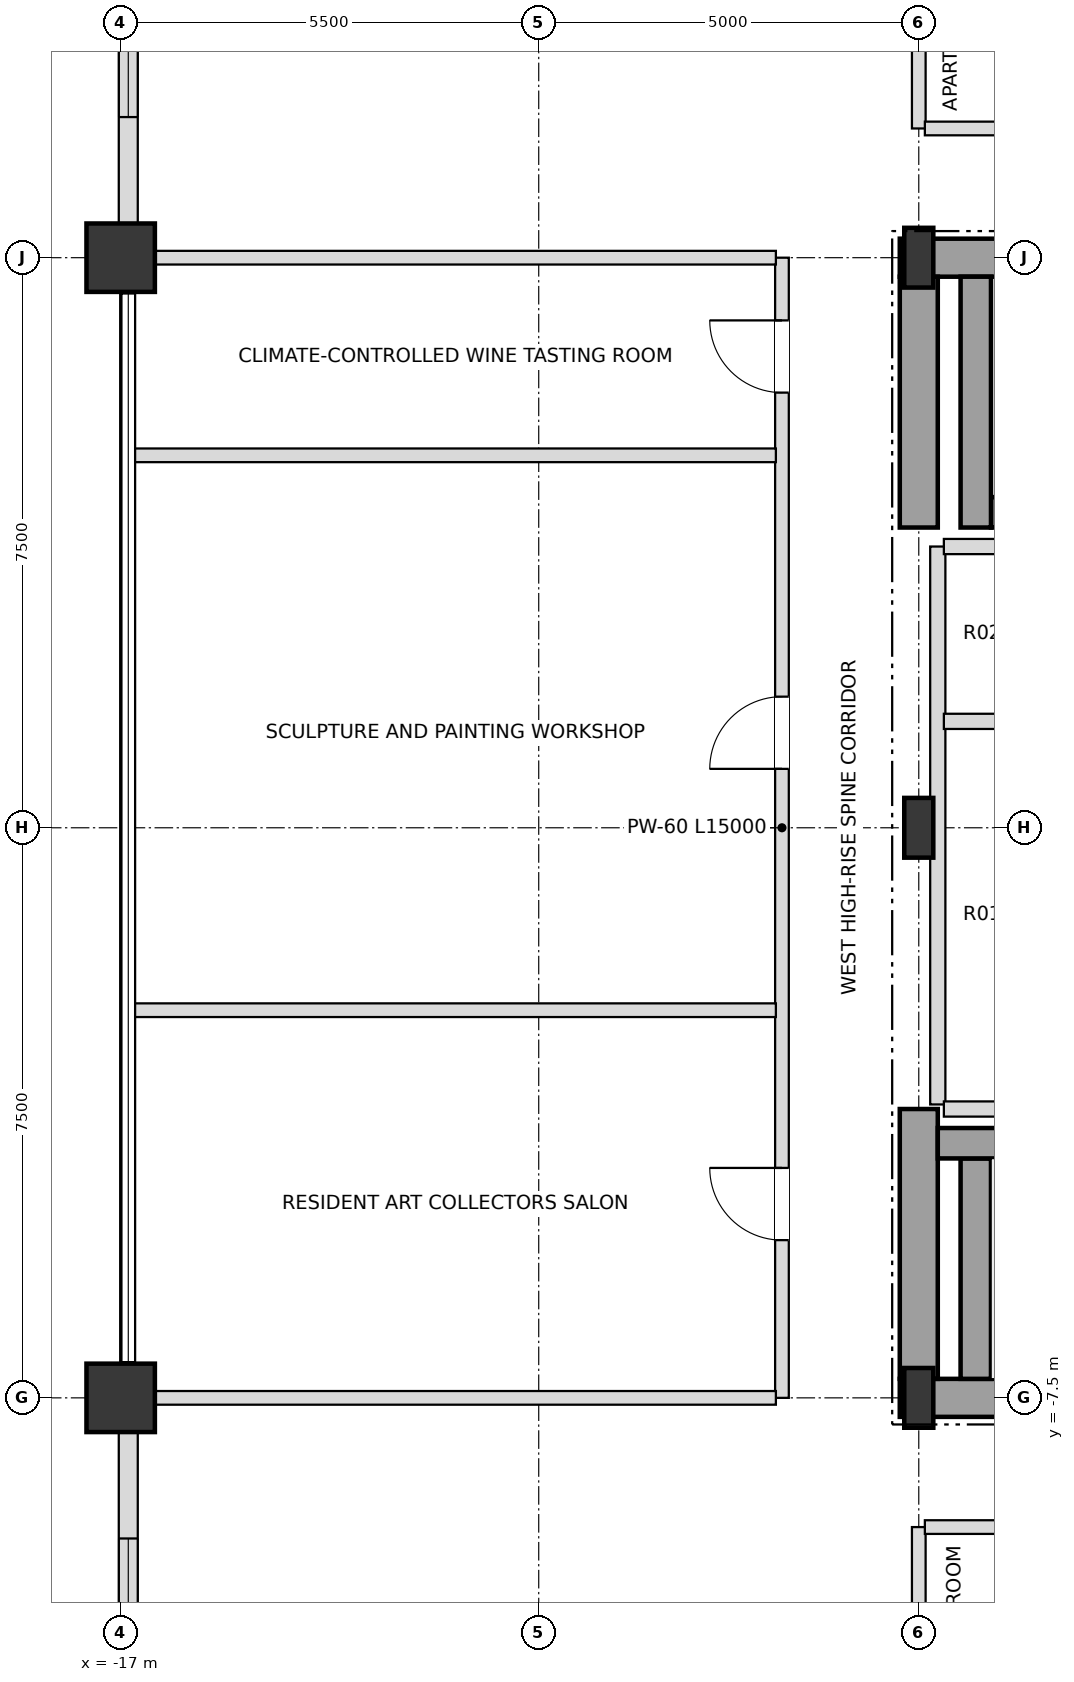
"""IFC4 building model, lengths in metres.
Left out: names, types, materials, properties, quantities, classifications, styles, units other than length and angle.
Written with IfcOpenShell. Run it as: python <this file> out.ifc"""

import sys

from ifc_helpers import new_model, si_unit, direction, frame, frame_2d, origin, origin_2d, place, context, subcontext, project, spatial, rectangle, i_section, extrude, element, fill, save


model = new_model("IFC4")
c1 = context("Model", 3, precision=1e-05, world=origin(), true_north=direction((0.0, 1.0)))
c2 = subcontext(c1, "Body", "Model", "MODEL_VIEW")
j1 = project(units=[si_unit("LENGTHUNIT", "METRE"), si_unit("PLANEANGLEUNIT", "RADIAN")], contexts=[c1])
p1 = place(None, origin())
s1 = spatial("IfcSite", under=j1, at=p1, CompositionType="ELEMENT")
p2 = place(p1, origin())
s2 = spatial("IfcBuilding", under=s1, at=p2, CompositionType="ELEMENT")
p3 = place(p2, frame((0.0, 0.0, 236.7)))
s3 = spatial("IfcBuildingStorey", under=s2, at=p3, CompositionType="ELEMENT", Elevation=236.7)
for number, where, z_axis, x_axis in (
    (1, (-6.5, -7.5, 0.0), (0.0, 0.0, 1.0), (1.0, 0.0, 0.0)),
    (2, (-6.5, 0.0, 0.0), (0.0, 0.0, 1.0), (1.0, 0.0, 0.0)),
    (3, (-6.5, 7.5, 0.0), (0.0, 0.0, 1.0), (1.0, 0.0, 0.0)),
):
    element("IfcColumn", number, at=place(p3, frame(where, z_axis=z_axis, x_axis=x_axis)), inside=s3, PredefinedType="COLUMN", context=c2, shape_type="SweptSolid", body=[
        extrude(i_section(OverallWidth=0.382, OverallDepth=0.786, WebThickness=0.02, FlangeThickness=0.033, at=origin_2d()), origin(), (0.0, 0.0, 1.0), 3.6),
    ])
for number, where, z_axis, x_axis in (
    (4, (-17.0, 7.5, 0.0), (0.0, 0.0, 1.0), (1.0, 0.0, 0.0)),
    (5, (-17.0, -7.5, 0.0), (0.0, 0.0, 1.0), (1.0, 0.0, 0.0)),
):
    element("IfcColumn", number, at=place(p3, frame(where, z_axis=z_axis, x_axis=x_axis)), inside=s3, PredefinedType="USERDEFINED", context=c2, shape_type="SweptSolid", body=[
        extrude(rectangle(XDim=0.9, YDim=0.9, at=origin_2d()), origin(), (0.0, 0.0, 1.0), 3.6),
    ])
p4 = place(p3, frame((-16.9, 12.555, 0.0), z_axis=(0.0, 0.0, 1.0), x_axis=(0.0, -1.0, 0.0)))
e6 = element("IfcWall", 6, at=p4, inside=s3, PredefinedType="SOLIDWALL", context=c2, shape_type="SweptSolid", body=[
    extrude(rectangle(XDim=4.61, YDim=0.25, at=frame_2d((2.305, 0.0))), origin(), (0.0, 0.0, 1.0), 2.748),
])
p5 = place(p4, frame((1.405, 0.0, 0.72)))
e7 = element("IfcOpeningElement", 7, at=p5, cuts=e6, PredefinedType="OPENING", context=c2, shape_type="SweptSolid", body=[
    extrude(rectangle(XDim=1.8, YDim=1.68, at=frame_2d((0.9, 0.84))), frame((0.0, 0.135, 0.0), z_axis=(0.0, -1.0, 0.0), x_axis=(1.0, 0.0, 0.0)), (0.0, 0.0, 1.0), 0.27),
])
p6 = place(p3, frame((-16.9, -7.945, 0.0), z_axis=(0.0, 0.0, 1.0), x_axis=(0.0, -1.0, 0.0)))
e8 = element("IfcWall", 8, at=p6, inside=s3, PredefinedType="SOLIDWALL", context=c2, shape_type="SweptSolid", body=[
    extrude(rectangle(XDim=4.61, YDim=0.25, at=frame_2d((2.305, 0.0))), origin(), (0.0, 0.0, 1.0), 2.748),
])
p7 = place(p6, frame((1.405, 0.0, 0.72)))
e9 = element("IfcOpeningElement", 9, at=p7, cuts=e8, PredefinedType="OPENING", context=c2, shape_type="SweptSolid", body=[
    extrude(rectangle(XDim=1.8, YDim=1.68, at=frame_2d((0.9, 0.84))), frame((0.0, 0.135, 0.0), z_axis=(0.0, -1.0, 0.0), x_axis=(1.0, 0.0, 0.0)), (0.0, 0.0, 1.0), 0.27),
])
p8 = place(p3, frame((-6.75, -7.5, 0.0), z_axis=(0.0, 0.0, 1.0), x_axis=(1.0, 0.0, 0.0)))
e10 = element("IfcWall", 10, at=p8, inside=s3, PredefinedType="SHEAR", context=c2, shape_type="SweptSolid", body=[
    extrude(rectangle(XDim=6.75, YDim=0.5, at=frame_2d((3.375, 0.0))), origin(), (0.0, 0.0, 1.0), 3.38),
])
p9 = place(p3, frame((-6.75, 7.5, 0.0), z_axis=(0.0, 0.0, 1.0), x_axis=(1.0, 0.0, 0.0)))
e11 = element("IfcWall", 11, at=p9, inside=s3, PredefinedType="SHEAR", context=c2, shape_type="SweptSolid", body=[
    extrude(rectangle(XDim=6.75, YDim=0.5, at=frame_2d((3.375, 0.0))), origin(), (0.0, 0.0, 1.0), 3.38),
])
p10 = place(p9, frame((1.65, 0.0, 0.0)))
e12 = element("IfcOpeningElement", 12, at=p10, cuts=e11, PredefinedType="OPENING", context=c2, shape_type="SweptSolid", body=[
    extrude(rectangle(XDim=1.05, YDim=2.15, at=frame_2d((0.525, 1.075))), frame((0.0, 0.26, 0.0), z_axis=(0.0, -1.0, 0.0), x_axis=(1.0, 0.0, 0.0)), (0.0, 0.0, 1.0), 0.52),
])
p11 = place(p3, frame((-6.5, -7.25, 0.0), z_axis=(0.0, 0.0, 1.0), x_axis=(0.0, 1.0, 0.0)))
e13 = element("IfcWall", 13, at=p11, inside=s3, PredefinedType="SHEAR", context=c2, shape_type="SweptSolid", body=[
    extrude(rectangle(XDim=3.55, YDim=0.5, at=frame_2d((1.775, 0.0))), origin(), (0.0, 0.0, 1.0), 3.38),
])
p12 = place(p3, frame((-6.5, 3.95, 0.0), z_axis=(0.0, 0.0, 1.0), x_axis=(0.0, 1.0, 0.0)))
e14 = element("IfcWall", 14, at=p12, inside=s3, PredefinedType="SHEAR", context=c2, shape_type="SweptSolid", body=[
    extrude(rectangle(XDim=3.3, YDim=0.5, at=frame_2d((1.65, 0.0))), origin(), (0.0, 0.0, 1.0), 3.38),
])
p13 = place(p3, frame((-5.75, -7.25, 0.0), z_axis=(0.0, 0.0, 1.0), x_axis=(0.0, 1.0, 0.0)))
e15 = element("IfcWall", 15, at=p13, inside=s3, PredefinedType="SHEAR", context=c2, shape_type="SweptSolid", body=[
    extrude(rectangle(XDim=2.9, YDim=0.4, at=frame_2d((1.45, 0.0))), origin(), (0.0, 0.0, 1.0), 3.38),
])
p14 = place(p3, frame((-6.25, -4.15, 0.0), z_axis=(0.0, 0.0, 1.0), x_axis=(1.0, 0.0, 0.0)))
e16 = element("IfcWall", 16, at=p14, inside=s3, PredefinedType="SHEAR", context=c2, shape_type="SweptSolid", body=[
    extrude(rectangle(XDim=7.78, YDim=0.4, at=frame_2d((3.89, 0.0))), origin(), (0.0, 0.0, 1.0), 3.38),
])
p15 = place(p3, frame((-5.55, 4.15, 0.0), z_axis=(0.0, 0.0, 1.0), x_axis=(1.0, 0.0, 0.0)))
e17 = element("IfcWall", 17, at=p15, inside=s3, PredefinedType="SHEAR", context=c2, shape_type="SweptSolid", body=[
    extrude(rectangle(XDim=7.08, YDim=0.4, at=frame_2d((3.54, 0.0))), origin(), (0.0, 0.0, 1.0), 3.38),
])
p16 = place(p3, frame((-5.75, 3.95, 0.0), z_axis=(0.0, 0.0, 1.0), x_axis=(0.0, 1.0, 0.0)))
e18 = element("IfcWall", 18, at=p16, inside=s3, PredefinedType="SHEAR", context=c2, shape_type="SweptSolid", body=[
    extrude(rectangle(XDim=3.3, YDim=0.4, at=frame_2d((1.65, 0.0))), origin(), (0.0, 0.0, 1.0), 3.38),
])
p17 = place(p3, frame((-8.3, -7.5, 0.0), z_axis=(0.0, 0.0, 1.0), x_axis=(0.0, 1.0, 0.0)))
e19 = element("IfcWall", 19, at=p17, inside=s3, PredefinedType="PARTITIONING", context=c2, shape_type="SweptSolid", body=[
    extrude(rectangle(XDim=15.0, YDim=0.18, at=frame_2d((7.5, 0.0))), origin(), (0.0, 0.0, 1.0), 3.38),
])
p18 = place(p17, frame((2.075, 0.0, 0.0)))
e20 = element("IfcOpeningElement", 20, at=p18, cuts=e19, PredefinedType="OPENING", context=c2, shape_type="SweptSolid", body=[
    extrude(rectangle(XDim=0.95, YDim=2.15, at=frame_2d((0.475, 1.075))), frame((0.0, 0.1, 0.0), z_axis=(0.0, -1.0, 0.0), x_axis=(1.0, 0.0, 0.0)), (0.0, 0.0, 1.0), 0.2),
])
p19 = place(p17, frame((8.275, 0.0, 0.0)))
e21 = element("IfcOpeningElement", 21, at=p19, cuts=e19, PredefinedType="OPENING", context=c2, shape_type="SweptSolid", body=[
    extrude(rectangle(XDim=0.95, YDim=2.15, at=frame_2d((0.475, 1.075))), frame((0.0, 0.1, 0.0), z_axis=(0.0, -1.0, 0.0), x_axis=(1.0, 0.0, 0.0)), (0.0, 0.0, 1.0), 0.2),
])
p20 = place(p17, frame((13.225, 0.0, 0.0)))
e22 = element("IfcOpeningElement", 22, at=p20, cuts=e19, PredefinedType="OPENING", context=c2, shape_type="SweptSolid", body=[
    extrude(rectangle(XDim=0.95, YDim=2.15, at=frame_2d((0.475, 1.075))), frame((0.0, 0.1, 0.0), z_axis=(0.0, -1.0, 0.0), x_axis=(1.0, 0.0, 0.0)), (0.0, 0.0, 1.0), 0.2),
])
for number, where, z_axis, x_axis in (
    (23, (-6.5, -19.9, 0.0), (0.0, 0.0, 1.0), (0.0, 1.0, 0.0)),
    (24, (-6.5, 9.2, 0.0), (0.0, 0.0, 1.0), (0.0, 1.0, 0.0)),
):
    element("IfcWall", number, at=place(p3, frame(where, z_axis=z_axis, x_axis=x_axis)), inside=s3, PredefinedType="PARTITIONING", context=c2, shape_type="SweptSolid", body=[
        extrude(rectangle(XDim=10.7, YDim=0.18, at=frame_2d((5.35, 0.0))), origin(), (0.0, 0.0, 1.0), 2.826),
    ])
p21 = place(p3, frame((-6.25, -3.64, 0.0), z_axis=(0.0, 0.0, 1.0), x_axis=(0.0, 1.0, 0.0)))
e25 = element("IfcWall", 25, at=p21, inside=s3, PredefinedType="SOLIDWALL", context=c2, shape_type="SweptSolid", body=[
    extrude(rectangle(XDim=7.34, YDim=0.2, at=frame_2d((3.67, 0.0))), origin(), (0.0, 0.0, 1.0), 3.38),
])
p22 = place(p3, frame((-6.42, -9.2, 0.0), z_axis=(0.0, 0.0, 1.0), x_axis=(1.0, 0.0, 0.0)))
e26 = element("IfcWall", 26, at=p22, inside=s3, PredefinedType="PARTITIONING", context=c2, shape_type="SweptSolid", body=[
    extrude(rectangle(XDim=1.69, YDim=0.18, at=frame_2d((0.845, 0.0))), origin(), (0.0, 0.0, 1.0), 3.38),
])
p23 = place(p3, frame((-16.9, -7.5, 0.0), z_axis=(0.0, 0.0, 1.0), x_axis=(1.0, 0.0, 0.0)))
e27 = element("IfcWall", 27, at=p23, inside=s3, PredefinedType="PARTITIONING", context=c2, shape_type="SweptSolid", body=[
    extrude(rectangle(XDim=8.52, YDim=0.18, at=frame_2d((4.26, 0.0))), origin(), (0.0, 0.0, 1.0), 2.826),
])
p24 = place(p3, frame((-6.17, -3.7, 0.0), z_axis=(0.0, 0.0, 1.0), x_axis=(1.0, 0.0, 0.0)))
e28 = element("IfcWall", 28, at=p24, inside=s3, PredefinedType="SOLIDWALL", context=c2, shape_type="SweptSolid", body=[
    extrude(rectangle(XDim=1.94, YDim=0.2, at=frame_2d((0.97, 0.0))), origin(), (0.0, 0.0, 1.0), 3.38),
])
p25 = place(p3, frame((-16.82, -2.4, 0.0), z_axis=(0.0, 0.0, 1.0), x_axis=(1.0, 0.0, 0.0)))
e29 = element("IfcWall", 29, at=p25, inside=s3, PredefinedType="PARTITIONING", context=c2, shape_type="SweptSolid", body=[
    extrude(rectangle(XDim=8.44, YDim=0.18, at=frame_2d((4.22, 0.0))), origin(), (0.0, 0.0, 1.0), 3.018),
])
for number, where, z_axis, x_axis in (
    (30, (-6.17, 1.4, 0.0), (0.0, 0.0, 1.0), (1.0, 0.0, 0.0)),
    (31, (-6.17, 3.7, 0.0), (0.0, 0.0, 1.0), (1.0, 0.0, 0.0)),
):
    element("IfcWall", number, at=place(p3, frame(where, z_axis=z_axis, x_axis=x_axis)), inside=s3, PredefinedType="SOLIDWALL", context=c2, shape_type="SweptSolid", body=[
        extrude(rectangle(XDim=1.94, YDim=0.2, at=frame_2d((0.97, 0.0))), origin(), (0.0, 0.0, 1.0), 3.38),
    ])
p26 = place(p3, frame((-16.82, 4.9, 0.0), z_axis=(0.0, 0.0, 1.0), x_axis=(1.0, 0.0, 0.0)))
e32 = element("IfcWall", 32, at=p26, inside=s3, PredefinedType="PARTITIONING", context=c2, shape_type="SweptSolid", body=[
    extrude(rectangle(XDim=8.44, YDim=0.18, at=frame_2d((4.22, 0.0))), origin(), (0.0, 0.0, 1.0), 3.018),
])
p27 = place(p3, frame((-16.9, 7.5, 0.0), z_axis=(0.0, 0.0, 1.0), x_axis=(1.0, 0.0, 0.0)))
e33 = element("IfcWall", 33, at=p27, inside=s3, PredefinedType="PARTITIONING", context=c2, shape_type="SweptSolid", body=[
    extrude(rectangle(XDim=8.52, YDim=0.18, at=frame_2d((4.26, 0.0))), origin(), (0.0, 0.0, 1.0), 2.826),
])
p28 = place(p3, frame((-6.42, 9.2, 0.0), z_axis=(0.0, 0.0, 1.0), x_axis=(1.0, 0.0, 0.0)))
e34 = element("IfcWall", 34, at=p28, inside=s3, PredefinedType="PARTITIONING", context=c2, shape_type="SweptSolid", body=[
    extrude(rectangle(XDim=1.64, YDim=0.18, at=frame_2d((0.82, 0.0))), origin(), (0.0, 0.0, 1.0), 3.38),
])
p29 = place(p5, origin())
e35 = element("IfcWindow", 35, at=p29, inside=s3, PartitioningType="SINGLE_PANEL", PredefinedType="WINDOW", context=c2, shape_type="SweptSolid", body=[
    extrude(rectangle(XDim=1.8, YDim=1.68, at=frame_2d((0.9, 0.84))), frame((0.0, 0.03, 0.0), z_axis=(0.0, -1.0, 0.0), x_axis=(1.0, 0.0, 0.0)), (0.0, 0.0, 1.0), 0.06),
])
fill(e7, e35)
p30 = place(p7, origin())
e36 = element("IfcWindow", 36, at=p30, inside=s3, PartitioningType="SINGLE_PANEL", PredefinedType="WINDOW", context=c2, shape_type="SweptSolid", body=[
    extrude(rectangle(XDim=1.8, YDim=1.68, at=frame_2d((0.9, 0.84))), frame((0.0, 0.03, 0.0), z_axis=(0.0, -1.0, 0.0), x_axis=(1.0, 0.0, 0.0)), (0.0, 0.0, 1.0), 0.06),
])
fill(e9, e36)
p31 = place(p18, origin())
e37 = element("IfcDoor", 37, at=p31, inside=s3, OperationType="SINGLE_SWING_RIGHT", PredefinedType="DOOR", context=c2, shape_type="SweptSolid", body=[
    extrude(rectangle(XDim=0.95, YDim=2.15, at=frame_2d((0.475, 1.075))), frame((0.0, 0.025, 0.0), z_axis=(0.0, -1.0, 0.0), x_axis=(1.0, 0.0, 0.0)), (0.0, 0.0, 1.0), 0.05),
])
fill(e20, e37)
p32 = place(p19, origin())
e38 = element("IfcDoor", 38, at=p32, inside=s3, OperationType="SINGLE_SWING_LEFT", PredefinedType="DOOR", context=c2, shape_type="SweptSolid", body=[
    extrude(rectangle(XDim=0.95, YDim=2.15, at=frame_2d((0.475, 1.075))), frame((0.0, 0.025, 0.0), z_axis=(0.0, -1.0, 0.0), x_axis=(1.0, 0.0, 0.0)), (0.0, 0.0, 1.0), 0.05),
])
fill(e21, e38)
p33 = place(p20, origin())
e39 = element("IfcDoor", 39, at=p33, inside=s3, OperationType="SINGLE_SWING_RIGHT", PredefinedType="DOOR", context=c2, shape_type="SweptSolid", body=[
    extrude(rectangle(XDim=0.95, YDim=2.15, at=frame_2d((0.475, 1.075))), frame((0.0, 0.025, 0.0), z_axis=(0.0, -1.0, 0.0), x_axis=(1.0, 0.0, 0.0)), (0.0, 0.0, 1.0), 0.05),
])
fill(e22, e39)
save(model, sys.argv[1])
